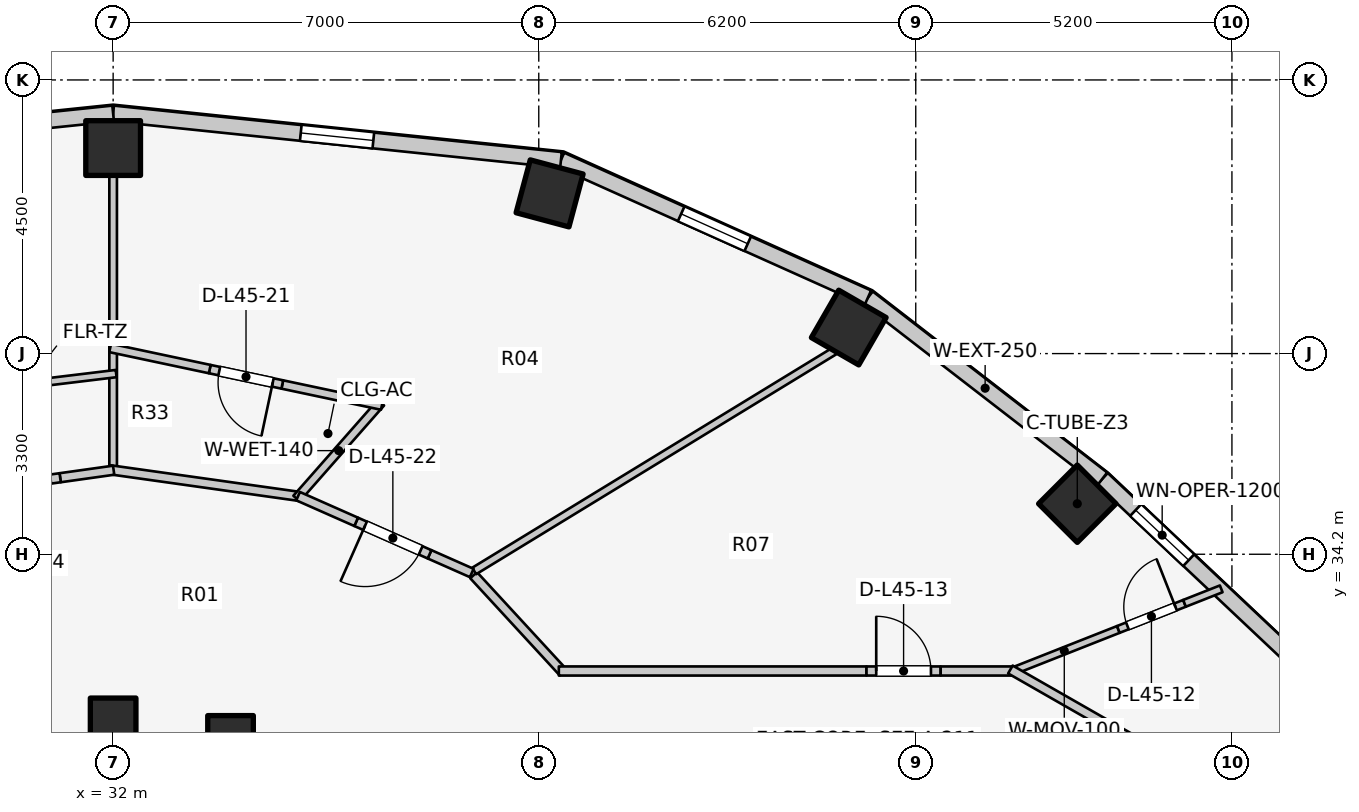
"""IFC4 building model, lengths in metres.
Left out: names, types, materials, properties, quantities, classifications, styles, units other than length and angle.
Written with IfcOpenShell. Run it as: python <this file> out.ifc"""

import sys

from ifc_helpers import new_model, si_unit, direction, frame, frame_2d, origin, origin_2d, place, context, subcontext, project, spatial, rectangle, extrude, element, fill, save


model = new_model("IFC4")
c1 = context("Model", 3, precision=1e-05, world=origin(), true_north=direction((0.0, 1.0)))
c2 = subcontext(c1, "Body", "Model", "MODEL_VIEW")
j1 = project(units=[si_unit("LENGTHUNIT", "METRE"), si_unit("PLANEANGLEUNIT", "RADIAN")], contexts=[c1])
p1 = place(None, origin())
s1 = spatial("IfcSite", under=j1, at=p1, CompositionType="ELEMENT")
p2 = place(p1, origin())
s2 = spatial("IfcBuilding", under=s1, at=p2, CompositionType="ELEMENT")
p3 = place(p2, frame((0.0, 0.0, 149.8)))
s3 = spatial("IfcBuildingStorey", under=s2, at=p3, CompositionType="ELEMENT", Elevation=149.8)
for number, where, z_axis, x_axis in (
    (1, (47.857, 35.031, 0.0), (0.0, 0.0, 1.0), (0.707, 0.707, 0.0)),
    (2, (44.098, 37.928, 0.0), (0.0, 0.0, 1.0), (0.5, 0.866, 0.0)),
):
    element("IfcColumn", number, at=place(p3, frame(where, z_axis=z_axis, x_axis=x_axis)), inside=s3, PredefinedType="COLUMN", context=c2, shape_type="SweptSolid", body=[
        extrude(rectangle(XDim=0.9, YDim=0.9, at=origin_2d()), origin(), (0.0, 0.0, 1.0), 3.1),
    ])
p4 = place(p3, frame((33.931, 31.172, 0.0), z_axis=(0.0, 0.0, 1.0), x_axis=(1.0, 0.0, 0.0)))
e3 = element("IfcColumn", 3, at=p4, inside=s3, PredefinedType="COLUMN", context=c2, shape_type="SweptSolid", body=[
    extrude(rectangle(XDim=0.75, YDim=0.75, at=origin_2d()), origin(), (0.0, 0.0, 1.0), 3.1),
])
p5 = place(p3, frame((39.178, 40.135, 0.0), z_axis=(0.0, 0.0, 1.0), x_axis=(0.258819045103, 0.965925826289, 0.0)))
e4 = element("IfcColumn", 4, at=p5, inside=s3, PredefinedType="COLUMN", context=c2, shape_type="SweptSolid", body=[
    extrude(rectangle(XDim=0.9, YDim=0.9, at=origin_2d()), origin(), (0.0, 0.0, 1.0), 3.1),
])
p6 = place(p3, frame((32.0, 31.46, 0.0), z_axis=(0.0, 0.0, 1.0), x_axis=(1.0, 0.0, 0.0)))
e5 = element("IfcColumn", 5, at=p6, inside=s3, PredefinedType="COLUMN", context=c2, shape_type="SweptSolid", body=[
    extrude(rectangle(XDim=0.75, YDim=0.75, at=origin_2d()), origin(), (0.0, 0.0, 1.0), 3.1),
])
p7 = place(p3, frame((32.0, 40.88, 0.0), z_axis=(0.0, 0.0, 1.0), x_axis=(0.0, 1.0, 0.0)))
e6 = element("IfcColumn", 6, at=p7, inside=s3, PredefinedType="COLUMN", context=c2, shape_type="SweptSolid", body=[
    extrude(rectangle(XDim=0.9, YDim=0.9, at=origin_2d()), origin(), (0.0, 0.0, 1.0), 3.1),
])
p8 = place(p3, frame((51.619, 32.284, 0.0), z_axis=(0.0, 0.0, 1.0), x_axis=(-0.727667301037, 0.68593024354, 0.0)))
e7 = element("IfcWall", 7, at=p8, inside=s3, PredefinedType="STANDARD", context=c2, shape_type="SweptSolid", body=[
    extrude(rectangle(XDim=4.604, YDim=0.26, at=frame_2d((2.302, 0.0))), origin(), (0.0, 0.0, 1.0), 1.22),
])
p9 = place(p8, frame((2.652, 0.0, 0.15)))
e8 = element("IfcOpeningElement", 8, at=p9, cuts=e7, PredefinedType="OPENING", context=c2, shape_type="SweptSolid", body=[
    extrude(rectangle(XDim=1.2, YDim=0.9, at=frame_2d((0.6, 0.45))), frame((0.0, 0.14, 0.0), z_axis=(0.0, -1.0, 0.0), x_axis=(1.0, 0.0, 0.0)), (0.0, 0.0, 1.0), 0.28),
])
p10 = place(p3, frame((48.269, 35.441, 0.0), z_axis=(0.0, 0.0, 1.0), x_axis=(-0.791460185804, 0.611220724687, 0.0)))
e9 = element("IfcWall", 9, at=p10, inside=s3, PredefinedType="STANDARD", context=c2, shape_type="SweptSolid", body=[
    extrude(rectangle(XDim=4.872, YDim=0.26, at=frame_2d((2.436, 0.0))), origin(), (0.0, 0.0, 1.0), 1.22),
])
p11 = place(p3, frame((44.413, 38.419, 0.0), z_axis=(0.0, 0.0, 1.0), x_axis=(-0.912353637112, 0.409403029847, 0.0)))
e10 = element("IfcWall", 10, at=p11, inside=s3, PredefinedType="STANDARD", context=c2, shape_type="SweptSolid", body=[
    extrude(rectangle(XDim=5.533, YDim=0.26, at=frame_2d((2.766, 0.0))), origin(), (0.0, 0.0, 1.0), 1.22),
])
p12 = place(p11, frame((2.167, 0.0, 0.15)))
e11 = element("IfcOpeningElement", 11, at=p12, cuts=e10, PredefinedType="OPENING", context=c2, shape_type="SweptSolid", body=[
    extrude(rectangle(XDim=1.2, YDim=0.9, at=frame_2d((0.6, 0.45))), frame((0.0, 0.14, 0.0), z_axis=(0.0, -1.0, 0.0), x_axis=(1.0, 0.0, 0.0)), (0.0, 0.0, 1.0), 0.28),
])
p13 = place(p3, frame((39.365, 40.685, 0.0), z_axis=(0.0, 0.0, 1.0), x_axis=(-0.994664178965, 0.10316574569, 0.0)))
e12 = element("IfcWall", 12, at=p13, inside=s3, PredefinedType="STANDARD", context=c2, shape_type="SweptSolid", body=[
    extrude(rectangle(XDim=7.405, YDim=0.26, at=frame_2d((3.702, 0.0))), origin(), (0.0, 0.0, 1.0), 1.22),
])
p14 = place(p13, frame((3.102, 0.0, 0.15)))
e13 = element("IfcOpeningElement", 13, at=p14, cuts=e12, PredefinedType="OPENING", context=c2, shape_type="SweptSolid", body=[
    extrude(rectangle(XDim=1.2, YDim=0.9, at=frame_2d((0.6, 0.45))), frame((0.0, 0.14, 0.0), z_axis=(0.0, -1.0, 0.0), x_axis=(1.0, 0.0, 0.0)), (0.0, 0.0, 1.0), 0.28),
])
p15 = place(p3, frame((32.0, 41.448, 0.0), z_axis=(0.0, 0.0, 1.0), x_axis=(-0.994664178965, -0.10316574569, 0.0)))
e14 = element("IfcWall", 14, at=p15, inside=s3, PredefinedType="STANDARD", context=c2, shape_type="SweptSolid", body=[
    extrude(rectangle(XDim=7.405, YDim=0.26, at=frame_2d((3.702, 0.0))), origin(), (0.0, 0.0, 1.0), 1.22),
])
p16 = place(p15, frame((3.102, 0.0, 0.15)))
e15 = element("IfcOpeningElement", 15, at=p16, cuts=e14, PredefinedType="OPENING", context=c2, shape_type="SweptSolid", body=[
    extrude(rectangle(XDim=1.2, YDim=0.9, at=frame_2d((0.6, 0.45))), frame((0.0, 0.14, 0.0), z_axis=(0.0, -1.0, 0.0), x_axis=(1.0, 0.0, 0.0)), (0.0, 0.0, 1.0), 0.28),
])
p17 = place(p3, frame((46.753, 32.262, 0.0), z_axis=(0.0, 0.0, 1.0), x_axis=(0.930227502765, 0.36698336897, 0.0)))
e16 = element("IfcWall", 16, at=p17, inside=s3, PredefinedType="MOVABLE", context=c2, shape_type="SweptSolid", body=[
    extrude(rectangle(XDim=1.912, YDim=0.12, at=frame_2d((0.956, 0.0))), origin(), (0.0, 0.0, 1.0), 1.22),
])
p18 = place(p3, frame((48.532, 32.963, 0.0), z_axis=(0.0, 0.0, 1.0), x_axis=(0.93017960314, 0.367104761482, 0.0)))
e17 = element("IfcWall", 17, at=p18, inside=s3, PredefinedType="MOVABLE", context=c2, shape_type="SweptSolid", body=[
    extrude(rectangle(XDim=1.17, YDim=0.12, at=frame_2d((0.585, 0.0))), origin(), (0.0, 0.0, 1.0), 2.11),
])
p19 = place(p18, frame((0.16, 0.0, 0.0)))
e18 = element("IfcOpeningElement", 18, at=p19, cuts=e17, PredefinedType="OPENING", context=c2, shape_type="SweptSolid", body=[
    extrude(rectangle(XDim=0.85, YDim=2.05, at=frame_2d((0.425, 1.025))), frame((0.0, 0.07, 0.0), z_axis=(0.0, -1.0, 0.0), x_axis=(1.0, 0.0, 0.0)), (0.0, 0.0, 1.0), 0.14),
])
p20 = place(p3, frame((49.62, 33.393, 0.0), z_axis=(0.0, 0.0, 1.0), x_axis=(0.9301788827, 0.367106586945, 0.0)))
e19 = element("IfcWall", 19, at=p20, inside=s3, PredefinedType="MOVABLE", context=c2, shape_type="SweptSolid", body=[
    extrude(rectangle(XDim=0.649, YDim=0.12, at=frame_2d((0.325, 0.0))), origin(), (0.0, 0.0, 1.0), 2.575),
])
p21 = place(p3, frame((37.928, 33.856, 0.0), z_axis=(0.0, 0.0, 1.0), x_axis=(0.677579737957, -0.735449317567, 0.0)))
e20 = element("IfcWall", 20, at=p21, inside=s3, PredefinedType="PARTITIONING", context=c2, shape_type="SweptSolid", body=[
    extrude(rectangle(XDim=2.173, YDim=0.15, at=frame_2d((1.086, 0.0))), origin(), (0.0, 0.0, 1.0), 2.019),
])
p22 = place(p3, frame((39.33, 32.28, 0.0), z_axis=(0.0, 0.0, 1.0), x_axis=(1.0, 0.0, 0.0)))
e21 = element("IfcWall", 21, at=p22, inside=s3, PredefinedType="PARTITIONING", context=c2, shape_type="SweptSolid", body=[
    extrude(rectangle(XDim=5.06, YDim=0.15, at=frame_2d((2.53, 0.0))), origin(), (0.0, 0.0, 1.0), 2.019),
])
p23 = place(p3, frame((44.39, 32.28, 0.0), z_axis=(0.0, 0.0, 1.0), x_axis=(1.0, 0.0, 0.0)))
e22 = element("IfcWall", 22, at=p23, inside=s3, PredefinedType="PARTITIONING", context=c2, shape_type="SweptSolid", body=[
    extrude(rectangle(XDim=1.22, YDim=0.15, at=frame_2d((0.61, 0.0))), origin(), (0.0, 0.0, 1.0), 2.575),
])
p24 = place(p23, frame((0.16, 0.0, 0.0)))
e23 = element("IfcOpeningElement", 23, at=p24, cuts=e22, PredefinedType="OPENING", context=c2, shape_type="SweptSolid", body=[
    extrude(rectangle(XDim=0.9, YDim=2.1, at=frame_2d((0.45, 1.05))), frame((0.0, 0.085, 0.0), z_axis=(0.0, -1.0, 0.0), x_axis=(1.0, 0.0, 0.0)), (0.0, 0.0, 1.0), 0.17),
])
p25 = place(p3, frame((45.61, 32.28, 0.0), z_axis=(0.0, 0.0, 1.0), x_axis=(1.0, 0.0, 0.0)))
e24 = element("IfcWall", 24, at=p25, inside=s3, PredefinedType="PARTITIONING", context=c2, shape_type="SweptSolid", body=[
    extrude(rectangle(XDim=1.24, YDim=0.15, at=frame_2d((0.62, 0.0))), origin(), (0.0, 0.0, 1.0), 2.575),
])
p26 = place(p3, frame((46.757, 32.305, 0.0), z_axis=(0.0, 0.0, 1.0), x_axis=(0.867991349648, -0.496579315857, 0.0)))
e25 = element("IfcWall", 25, at=p26, inside=s3, PredefinedType="PARTITIONING", context=c2, shape_type="SweptSolid", body=[
    extrude(rectangle(XDim=2.567, YDim=0.15, at=frame_2d((1.283, 0.0))), origin(), (0.0, 0.0, 1.0), 1.22),
])
p27 = place(p3, frame((37.938, 33.925, 0.0), z_axis=(0.0, 0.0, 1.0), x_axis=(0.853440334679, 0.521190555501, 0.0)))
e26 = element("IfcWall", 26, at=p27, inside=s3, PredefinedType="PARTITIONING", context=c2, shape_type="SweptSolid", body=[
    extrude(rectangle(XDim=6.966, YDim=0.125, at=frame_2d((3.483, 0.0))), origin(), (0.0, 0.0, 1.0), 1.22),
])
p28 = place(p3, frame((32.0, 35.637, 0.0), z_axis=(0.0, 0.0, 1.0), x_axis=(0.0, 1.0, 0.0)))
e27 = element("IfcWall", 27, at=p28, inside=s3, PredefinedType="PARTITIONING", context=c2, shape_type="SweptSolid", body=[
    extrude(rectangle(XDim=4.813, YDim=0.125, at=frame_2d((2.406, 0.0))), origin(), (0.0, 0.0, 1.0), 1.22),
])
p29 = place(p3, frame((35.099, 35.146, 0.0), z_axis=(0.0, 0.0, 1.0), x_axis=(-0.990251283702, 0.139292480508, 0.0)))
e28 = element("IfcWall", 28, at=p29, inside=s3, PredefinedType="PARTITIONING", context=c2, shape_type="SweptSolid", body=[
    extrude(rectangle(XDim=3.179, YDim=0.15, at=frame_2d((1.59, 0.0))), origin(), (0.0, 0.0, 1.0), 2.019),
])
p30 = place(p3, frame((35.016, 35.116, 0.0), z_axis=(0.0, 0.0, 1.0), x_axis=(0.660559753652, 0.750773475727, 0.0)))
e29 = element("IfcWall", 29, at=p30, inside=s3, PredefinedType="PLUMBINGWALL", context=c2, shape_type="SweptSolid", body=[
    extrude(rectangle(XDim=2.1, YDim=0.14, at=frame_2d((1.05, 0.0))), origin(), (0.0, 0.0, 1.0), 2.105),
])
p31 = place(p3, frame((36.419, 36.644, 0.0), z_axis=(0.0, 0.0, 1.0), x_axis=(-0.978225152663, 0.207546502496, 0.0)))
e30 = element("IfcWall", 30, at=p31, inside=s3, PredefinedType="PLUMBINGWALL", context=c2, shape_type="SweptSolid", body=[
    extrude(rectangle(XDim=1.674, YDim=0.14, at=frame_2d((0.837, 0.0))), origin(), (0.0, 0.0, 1.0), 2.575),
])
p32 = place(p3, frame((34.782, 36.992, 0.0), z_axis=(0.0, 0.0, 1.0), x_axis=(-0.97818732348, 0.20772472213, 0.0)))
e31 = element("IfcWall", 31, at=p32, inside=s3, PredefinedType="PLUMBINGWALL", context=c2, shape_type="SweptSolid", body=[
    extrude(rectangle(XDim=1.22, YDim=0.14, at=frame_2d((0.61, 0.0))), origin(), (0.0, 0.0, 1.0), 2.575),
])
p33 = place(p32, frame((0.16, 0.0, 0.0)))
e32 = element("IfcOpeningElement", 32, at=p33, cuts=e31, PredefinedType="OPENING", context=c2, shape_type="SweptSolid", body=[
    extrude(rectangle(XDim=0.9, YDim=2.1, at=frame_2d((0.45, 1.05))), frame((0.0, 0.08, 0.0), z_axis=(0.0, -1.0, 0.0), x_axis=(1.0, 0.0, 0.0)), (0.0, 0.0, 1.0), 0.16),
])
p34 = place(p3, frame((33.589, 37.245, 0.0), z_axis=(0.0, 0.0, 1.0), x_axis=(-0.978254755399, 0.207406927416, 0.0)))
e33 = element("IfcWall", 33, at=p34, inside=s3, PredefinedType="PLUMBINGWALL", context=c2, shape_type="SweptSolid", body=[
    extrude(rectangle(XDim=1.674, YDim=0.14, at=frame_2d((0.837, 0.0))), origin(), (0.0, 0.0, 1.0), 2.019),
])
p35 = place(p3, frame((37.898, 33.892, 0.0), z_axis=(0.0, 0.0, 1.0), x_axis=(-0.914526186943, 0.404526702945, 0.0)))
e34 = element("IfcWall", 34, at=p35, inside=s3, PredefinedType="PARTITIONING", context=c2, shape_type="SweptSolid", body=[
    extrude(rectangle(XDim=0.759, YDim=0.15, at=frame_2d((0.38, 0.0))), origin(), (0.0, 0.0, 1.0), 2.575),
])
p36 = place(p3, frame((37.204, 34.199, 0.0), z_axis=(0.0, 0.0, 1.0), x_axis=(-0.914549810084, 0.404473293155, 0.0)))
e35 = element("IfcWall", 35, at=p36, inside=s3, PredefinedType="PARTITIONING", context=c2, shape_type="SweptSolid", body=[
    extrude(rectangle(XDim=1.32, YDim=0.15, at=frame_2d((0.66, 0.0))), origin(), (0.0, 0.0, 1.0), 2.16),
])
p37 = place(p36, frame((0.16, 0.0, 0.0)))
e36 = element("IfcOpeningElement", 36, at=p37, cuts=e35, PredefinedType="OPENING", context=c2, shape_type="SweptSolid", body=[
    extrude(rectangle(XDim=1.0, YDim=2.1, at=frame_2d((0.5, 1.05))), frame((0.0, 0.085, 0.0), z_axis=(0.0, -1.0, 0.0), x_axis=(1.0, 0.0, 0.0)), (0.0, 0.0, 1.0), 0.17),
])
p38 = place(p3, frame((35.997, 34.733, 0.0), z_axis=(0.0, 0.0, 1.0), x_axis=(-0.914475459316, 0.40464136505, 0.0)))
e37 = element("IfcWall", 37, at=p38, inside=s3, PredefinedType="PARTITIONING", context=c2, shape_type="SweptSolid", body=[
    extrude(rectangle(XDim=1.044, YDim=0.15, at=frame_2d((0.522, 0.0))), origin(), (0.0, 0.0, 1.0), 2.019),
])
p39 = place(p3, frame((32.05, 37.171, 0.0), z_axis=(0.0, 0.0, 1.0), x_axis=(-0.992769444963, -0.120036782477, 0.0)))
e38 = element("IfcWall", 38, at=p39, inside=s3, PredefinedType="MOVABLE", context=c2, shape_type="SweptSolid", body=[
    extrude(rectangle(XDim=1.609, YDim=0.12, at=frame_2d((0.804, 0.0))), origin(), (0.0, 0.0, 1.0), 2.019),
])
p40 = place(p3, frame((32.008, 35.582, 0.0), z_axis=(0.0, 0.0, 1.0), x_axis=(-0.990276708961, -0.139111608755, 0.0)))
e39 = element("IfcWall", 39, at=p40, inside=s3, PredefinedType="PARTITIONING", context=c2, shape_type="SweptSolid", body=[
    extrude(rectangle(XDim=0.888, YDim=0.15, at=frame_2d((0.444, 0.0))), origin(), (0.0, 0.0, 1.0), 2.019),
])
p41 = place(p3, frame((31.129, 35.458, 0.0), z_axis=(0.0, 0.0, 1.0), x_axis=(-0.990254187593, -0.139271834751, 0.0)))
e40 = element("IfcWall", 40, at=p41, inside=s3, PredefinedType="PARTITIONING", context=c2, shape_type="SweptSolid", body=[
    extrude(rectangle(XDim=1.32, YDim=0.15, at=frame_2d((0.66, 0.0))), origin(), (0.0, 0.0, 1.0), 2.575),
])
p42 = place(p41, frame((0.16, 0.0, 0.0)))
e41 = element("IfcOpeningElement", 41, at=p42, cuts=e40, PredefinedType="OPENING", context=c2, shape_type="SweptSolid", body=[
    extrude(rectangle(XDim=1.0, YDim=2.1, at=frame_2d((0.5, 1.05))), frame((0.0, 0.085, 0.0), z_axis=(0.0, -1.0, 0.0), x_axis=(1.0, 0.0, 0.0)), (0.0, 0.0, 1.0), 0.17),
])
p43 = place(p9, origin())
e42 = element("IfcWindow", 42, at=p43, inside=s3, PartitioningType="SINGLE_PANEL", PredefinedType="WINDOW", context=c2, shape_type="SweptSolid", body=[
    extrude(rectangle(XDim=1.2, YDim=0.9, at=frame_2d((0.6, 0.45))), frame((0.0, 0.03, 0.0), z_axis=(0.0, -1.0, 0.0), x_axis=(1.0, 0.0, 0.0)), (0.0, 0.0, 1.0), 0.06),
])
fill(e8, e42)
p44 = place(p12, origin())
e43 = element("IfcWindow", 43, at=p44, inside=s3, PartitioningType="SINGLE_PANEL", PredefinedType="WINDOW", context=c2, shape_type="SweptSolid", body=[
    extrude(rectangle(XDim=1.2, YDim=0.9, at=frame_2d((0.6, 0.45))), frame((0.0, 0.03, 0.0), z_axis=(0.0, -1.0, 0.0), x_axis=(1.0, 0.0, 0.0)), (0.0, 0.0, 1.0), 0.06),
])
fill(e11, e43)
p45 = place(p14, origin())
e44 = element("IfcWindow", 44, at=p45, inside=s3, PartitioningType="SINGLE_PANEL", PredefinedType="WINDOW", context=c2, shape_type="SweptSolid", body=[
    extrude(rectangle(XDim=1.2, YDim=0.9, at=frame_2d((0.6, 0.45))), frame((0.0, 0.03, 0.0), z_axis=(0.0, -1.0, 0.0), x_axis=(1.0, 0.0, 0.0)), (0.0, 0.0, 1.0), 0.06),
])
fill(e13, e44)
p46 = place(p19, origin())
e45 = element("IfcDoor", 45, at=p46, inside=s3, OperationType="SINGLE_SWING_RIGHT", PredefinedType="DOOR", context=c2, shape_type="SweptSolid", body=[
    extrude(rectangle(XDim=0.85, YDim=2.05, at=frame_2d((0.425, 1.025))), frame((0.0, 0.025, 0.0), z_axis=(0.0, -1.0, 0.0), x_axis=(1.0, 0.0, 0.0)), (0.0, 0.0, 1.0), 0.05),
])
fill(e18, e45)
p47 = place(p24, origin())
e46 = element("IfcDoor", 46, at=p47, inside=s3, OperationType="SINGLE_SWING_LEFT", PredefinedType="DOOR", context=c2, shape_type="SweptSolid", body=[
    extrude(rectangle(XDim=0.9, YDim=2.1, at=frame_2d((0.45, 1.05))), frame((0.0, 0.025, 0.0), z_axis=(0.0, -1.0, 0.0), x_axis=(1.0, 0.0, 0.0)), (0.0, 0.0, 1.0), 0.05),
])
fill(e23, e46)
p48 = place(p33, origin())
e47 = element("IfcDoor", 47, at=p48, inside=s3, OperationType="SINGLE_SWING_LEFT", PredefinedType="DOOR", context=c2, shape_type="SweptSolid", body=[
    extrude(rectangle(XDim=0.9, YDim=2.1, at=frame_2d((0.45, 1.05))), frame((0.0, 0.025, 0.0), z_axis=(0.0, -1.0, 0.0), x_axis=(1.0, 0.0, 0.0)), (0.0, 0.0, 1.0), 0.05),
])
fill(e32, e47)
p49 = place(p37, origin())
e48 = element("IfcDoor", 48, at=p49, inside=s3, OperationType="SINGLE_SWING_RIGHT", PredefinedType="DOOR", context=c2, shape_type="SweptSolid", body=[
    extrude(rectangle(XDim=1.0, YDim=2.1, at=frame_2d((0.5, 1.05))), frame((0.0, 0.025, 0.0), z_axis=(0.0, -1.0, 0.0), x_axis=(1.0, 0.0, 0.0)), (0.0, 0.0, 1.0), 0.05),
])
fill(e36, e48)
save(model, sys.argv[1])
